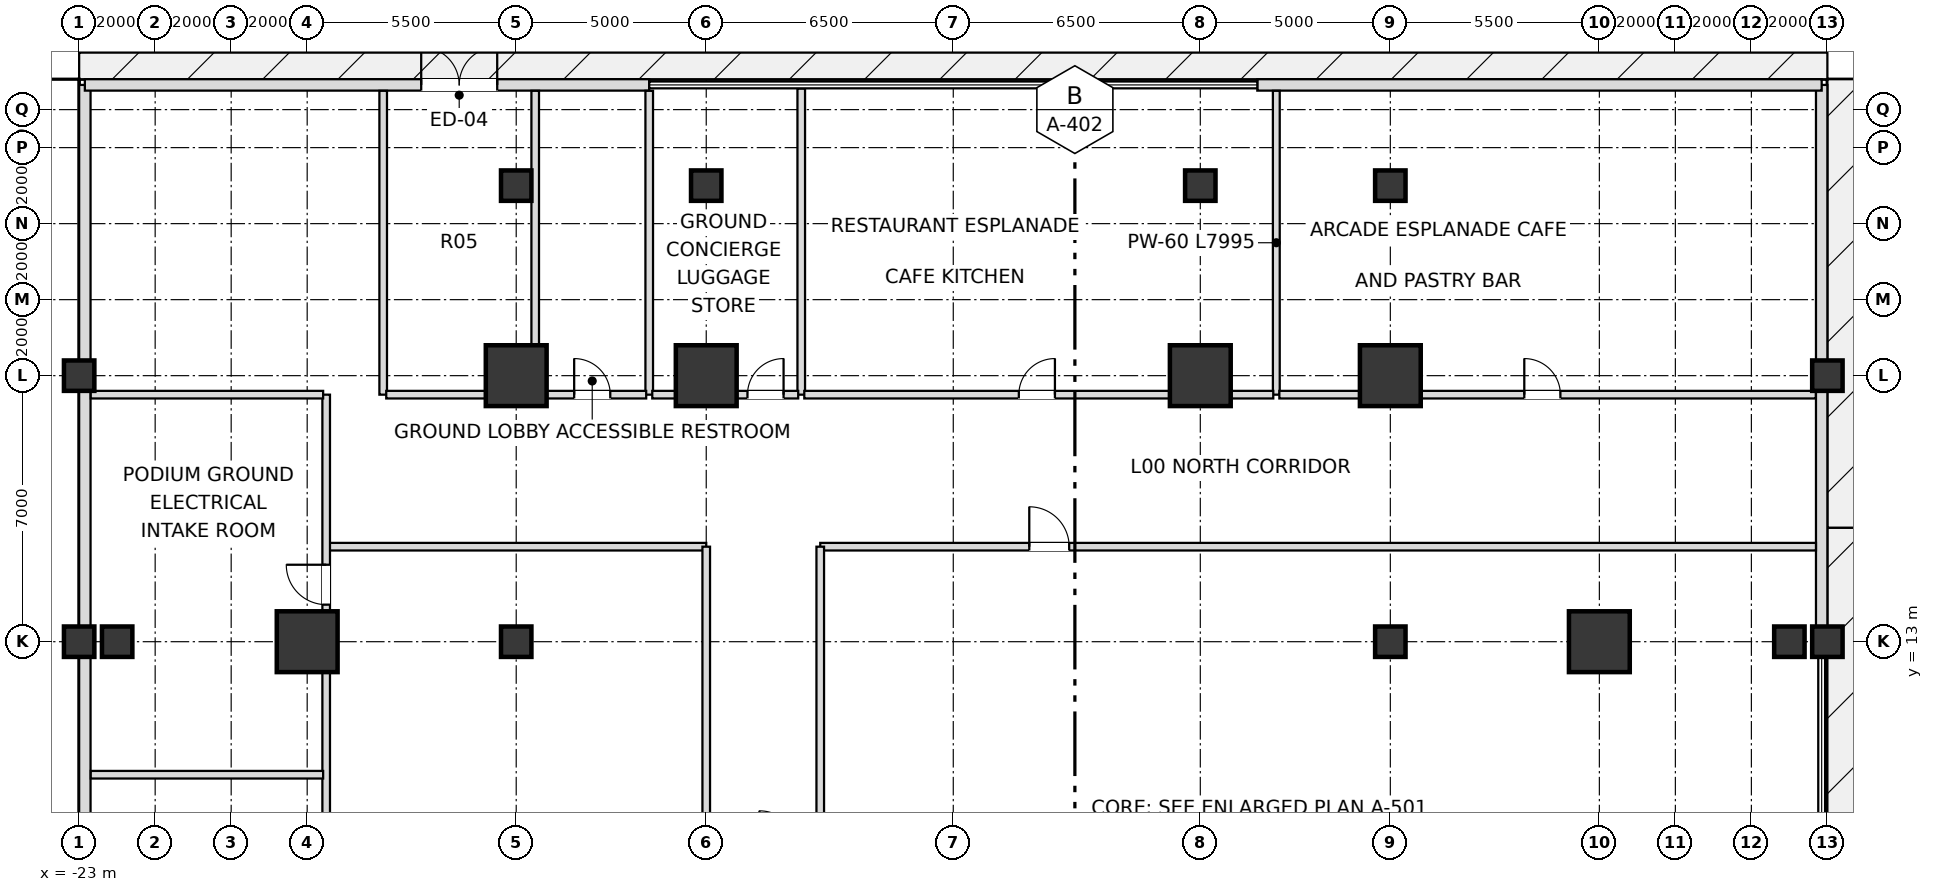
"""IFC4 building model, lengths in metres.
Left out: names, types, materials, properties, quantities, classifications, styles, units other than length and angle.
Written with IfcOpenShell. Run it as: python <this file> out.ifc"""

import sys

from ifc_helpers import new_model, si_unit, direction, frame, frame_2d, origin, origin_2d, place, context, subcontext, project, spatial, rectangle, extrude, element, fill, save


model = new_model("IFC4")
c1 = context("Model", 3, precision=1e-05, world=origin(), true_north=direction((0.0, 1.0)))
c2 = subcontext(c1, "Body", "Model", "MODEL_VIEW")
j1 = project(units=[si_unit("LENGTHUNIT", "METRE"), si_unit("PLANEANGLEUNIT", "RADIAN")], contexts=[c1])
p1 = place(None, origin())
s1 = spatial("IfcSite", under=j1, at=p1, CompositionType="ELEMENT")
p2 = place(p1, origin())
s2 = spatial("IfcBuilding", under=s1, at=p2, CompositionType="ELEMENT")
p3 = place(p2, origin())
s3 = spatial("IfcBuildingStorey", under=s2, at=p3, CompositionType="ELEMENT", Elevation=0.0)
for number, where, z_axis, x_axis in (
    (1, (17.0, 13.0, 0.0), (0.0, 0.0, 1.0), (1.0, 0.0, 0.0)),
    (2, (11.5, 20.0, 0.0), (0.0, 0.0, 1.0), (1.0, 0.0, 0.0)),
    (3, (6.5, 20.0, 0.0), (0.0, 0.0, 1.0), (1.0, 0.0, 0.0)),
    (4, (-6.5, 20.0, 0.0), (0.0, 0.0, 1.0), (1.0, 0.0, 0.0)),
    (5, (-11.5, 20.0, 0.0), (0.0, 0.0, 1.0), (1.0, 0.0, 0.0)),
    (6, (-17.0, 13.0, 0.0), (0.0, 0.0, 1.0), (1.0, 0.0, 0.0)),
):
    element("IfcColumn", number, at=place(p3, frame(where, z_axis=z_axis, x_axis=x_axis)), inside=s3, PredefinedType="USERDEFINED", context=c2, shape_type="SweptSolid", body=[
        extrude(rectangle(XDim=1.6, YDim=1.6, at=origin_2d()), origin(), (0.0, 0.0, 1.0), 6.0),
    ])
for number, where, z_axis, x_axis in (
    (7, (-23.0, 13.0, 0.0), (0.0, 0.0, 1.0), (1.0, 0.0, 0.0)),
    (8, (-23.0, 20.0, 0.0), (0.0, 0.0, 1.0), (1.0, 0.0, 0.0)),
    (9, (23.0, 13.0, 0.0), (0.0, 0.0, 1.0), (1.0, 0.0, 0.0)),
    (10, (23.0, 20.0, 0.0), (0.0, 0.0, 1.0), (1.0, 0.0, 0.0)),
    (11, (-11.5, 13.0, 0.0), (0.0, 0.0, 1.0), (1.0, 0.0, 0.0)),
    (12, (11.5, 13.0, 0.0), (0.0, 0.0, 1.0), (1.0, 0.0, 0.0)),
    (13, (-22.0, 13.0, 0.0), (0.0, 0.0, 1.0), (1.0, 0.0, 0.0)),
    (14, (-11.5, 25.0, 0.0), (0.0, 0.0, 1.0), (1.0, 0.0, 0.0)),
    (15, (-6.5, 25.0, 0.0), (0.0, 0.0, 1.0), (1.0, 0.0, 0.0)),
    (16, (6.5, 25.0, 0.0), (0.0, 0.0, 1.0), (1.0, 0.0, 0.0)),
    (17, (11.5, 25.0, 0.0), (0.0, 0.0, 1.0), (1.0, 0.0, 0.0)),
    (18, (22.0, 13.0, 0.0), (0.0, 0.0, 1.0), (1.0, 0.0, 0.0)),
):
    element("IfcColumn", number, at=place(p3, frame(where, z_axis=z_axis, x_axis=x_axis)), inside=s3, PredefinedType="COLUMN", context=c2, shape_type="SweptSolid", body=[
        extrude(rectangle(XDim=0.8, YDim=0.8, at=origin_2d()), origin(), (0.0, 0.0, 1.0), 6.0),
    ])
p4 = place(p3, frame((-22.85, 27.65, 0.0), z_axis=(0.0, 0.0, 1.0), x_axis=(0.0, -1.0, 0.0)))
e19 = element("IfcWall", 19, at=p4, inside=s3, PredefinedType="SOLIDWALL", context=c2, shape_type="SweptSolid", body=[
    extrude(rectangle(XDim=55.3, YDim=0.3, at=frame_2d((27.65, 0.0))), origin(), (0.0, 0.0, 1.0), 5.076),
])
p5 = place(p4, frame((21.0, 0.0, 0.0)))
e20 = element("IfcOpeningElement", 20, at=p5, cuts=e19, PredefinedType="OPENING", context=c2, shape_type="SweptSolid", body=[
    extrude(rectangle(XDim=4.2, YDim=3.4, at=frame_2d((2.1, 1.7))), frame((0.0, 0.16, 0.0), z_axis=(0.0, -1.0, 0.0), x_axis=(1.0, 0.0, 0.0)), (0.0, 0.0, 1.0), 0.32),
])
p6 = place(p3, frame((22.85, 13.0, 0.0), z_axis=(0.0, 0.0, 1.0), x_axis=(0.0, 1.0, 0.0)))
e21 = element("IfcWall", 21, at=p6, inside=s3, PredefinedType="SOLIDWALL", context=c2, shape_type="SweptSolid", body=[
    extrude(rectangle(XDim=14.65, YDim=0.3, at=frame_2d((7.325, 0.0))), origin(), (0.0, 0.0, 1.0), 5.076),
])
p7 = place(p3, frame((-22.85, 27.65, 0.0), z_axis=(0.0, 0.0, 1.0), x_axis=(1.0, 0.0, 0.0)))
e22 = element("IfcWall", 22, at=p7, inside=s3, PredefinedType="SOLIDWALL", context=c2, shape_type="SweptSolid", body=[
    extrude(rectangle(XDim=14.85, YDim=0.3, at=frame_2d((7.425, 0.0))), origin(), (0.0, 0.0, 1.0), 5.72),
])
p8 = place(p7, frame((8.85, 0.0, 0.0)))
e23 = element("IfcOpeningElement", 23, at=p8, cuts=e22, PredefinedType="OPENING", context=c2, shape_type="SweptSolid", body=[
    extrude(rectangle(XDim=2.0, YDim=2.2, at=frame_2d((1.0, 1.1))), frame((0.0, 0.16, 0.0), z_axis=(0.0, -1.0, 0.0), x_axis=(1.0, 0.0, 0.0)), (0.0, 0.0, 1.0), 0.32),
])
p9 = place(p3, frame((8.0, 27.65, 0.0), z_axis=(0.0, 0.0, 1.0), x_axis=(1.0, 0.0, 0.0)))
e24 = element("IfcWall", 24, at=p9, inside=s3, PredefinedType="SOLIDWALL", context=c2, shape_type="SweptSolid", body=[
    extrude(rectangle(XDim=14.85, YDim=0.3, at=frame_2d((7.425, 0.0))), origin(), (0.0, 0.0, 1.0), 5.72),
])
p10 = place(p3, frame((-16.5, 15.5, 0.0), z_axis=(0.0, 0.0, 1.0), x_axis=(1.0, 0.0, 0.0)))
e25 = element("IfcWall", 25, at=p10, inside=s3, PredefinedType="SOLIDWALL", context=c2, shape_type="SweptSolid", body=[
    extrude(rectangle(XDim=10.0, YDim=0.2, at=frame_2d((5.0, 0.0))), origin(), (0.0, 0.0, 1.0), 5.01),
])
p11 = place(p3, frame((-3.5, 15.5, 0.0), z_axis=(0.0, 0.0, 1.0), x_axis=(1.0, 0.0, 0.0)))
e26 = element("IfcWall", 26, at=p11, inside=s3, PredefinedType="SOLIDWALL", context=c2, shape_type="SweptSolid", body=[
    extrude(rectangle(XDim=26.2, YDim=0.2, at=frame_2d((13.1, 0.0))), origin(), (0.0, 0.0, 1.0), 5.01),
])
p12 = place(p11, frame((5.5, 0.0, 0.0)))
e27 = element("IfcOpeningElement", 27, at=p12, cuts=e26, PredefinedType="OPENING", context=c2, shape_type="SweptSolid", body=[
    extrude(rectangle(XDim=1.05, YDim=2.15, at=frame_2d((0.525, 1.075))), frame((0.0, 0.11, 0.0), z_axis=(0.0, -1.0, 0.0), x_axis=(1.0, 0.0, 0.0)), (0.0, 0.0, 1.0), 0.22),
])
for number, where, z_axis, x_axis in (
    (28, (-6.5, 7.5, 0.0), (0.0, 0.0, 1.0), (0.0, 1.0, 0.0)),
    (29, (-3.5, 7.5, 0.0), (0.0, 0.0, 1.0), (0.0, 1.0, 0.0)),
):
    element("IfcWall", number, at=place(p3, frame(where, z_axis=z_axis, x_axis=x_axis)), inside=s3, PredefinedType="SOLIDWALL", context=c2, shape_type="SweptSolid", body=[
        extrude(rectangle(XDim=8.0, YDim=0.2, at=frame_2d((4.0, 0.0))), origin(), (0.0, 0.0, 1.0), 5.01),
    ])
p13 = place(p3, frame((-16.5, -19.5, 0.0), z_axis=(0.0, 0.0, 1.0), x_axis=(0.0, 1.0, 0.0)))
e30 = element("IfcWall", 30, at=p13, inside=s3, PredefinedType="SOLIDWALL", context=c2, shape_type="SweptSolid", body=[
    extrude(rectangle(XDim=39.0, YDim=0.2, at=frame_2d((19.5, 0.0))), origin(), (0.0, 0.0, 1.0), 5.01),
])
p14 = place(p13, frame((20.975, 0.0, 0.0)))
e31 = element("IfcOpeningElement", 31, at=p14, cuts=e30, PredefinedType="OPENING", context=c2, shape_type="SweptSolid", body=[
    extrude(rectangle(XDim=1.05, YDim=2.15, at=frame_2d((0.525, 1.075))), frame((0.0, 0.11, 0.0), z_axis=(0.0, -1.0, 0.0), x_axis=(1.0, 0.0, 0.0)), (0.0, 0.0, 1.0), 0.22),
])
p15 = place(p13, frame((8.025, 0.0, 0.0)))
e32 = element("IfcOpeningElement", 32, at=p15, cuts=e30, PredefinedType="OPENING", context=c2, shape_type="SweptSolid", body=[
    extrude(rectangle(XDim=0.95, YDim=2.15, at=frame_2d((0.475, 1.075))), frame((0.0, 0.11, 0.0), z_axis=(0.0, -1.0, 0.0), x_axis=(1.0, 0.0, 0.0)), (0.0, 0.0, 1.0), 0.22),
])
p16 = place(p13, frame((33.475, 0.0, 0.0)))
e33 = element("IfcOpeningElement", 33, at=p16, cuts=e30, PredefinedType="OPENING", context=c2, shape_type="SweptSolid", body=[
    extrude(rectangle(XDim=1.05, YDim=2.15, at=frame_2d((0.525, 1.075))), frame((0.0, 0.11, 0.0), z_axis=(0.0, -1.0, 0.0), x_axis=(1.0, 0.0, 0.0)), (0.0, 0.0, 1.0), 0.22),
])
for number, where, z_axis, x_axis in (
    (34, (-15.0, 19.5, 0.0), (0.0, 0.0, 1.0), (0.0, 1.0, 0.0)),
    (35, (-11.0, 19.5, 0.0), (0.0, 0.0, 1.0), (0.0, 1.0, 0.0)),
    (36, (-8.0, 19.5, 0.0), (0.0, 0.0, 1.0), (0.0, 1.0, 0.0)),
):
    element("IfcWall", number, at=place(p3, frame(where, z_axis=z_axis, x_axis=x_axis)), inside=s3, PredefinedType="SOLIDWALL", context=c2, shape_type="SweptSolid", body=[
        extrude(rectangle(XDim=7.995, YDim=0.2, at=frame_2d((3.998, 0.0))), origin(), (0.0, 0.0, 1.0), 5.076),
    ])
p17 = place(p3, frame((-4.0, 19.5, 0.0), z_axis=(0.0, 0.0, 1.0), x_axis=(0.0, 1.0, 0.0)))
e37 = element("IfcWall", 37, at=p17, inside=s3, PredefinedType="SOLIDWALL", context=c2, shape_type="SweptSolid", body=[
    extrude(rectangle(XDim=8.055, YDim=0.2, at=frame_2d((4.027, 0.0))), origin(), (0.0, 0.0, 1.0), 5.076),
])
p18 = place(p3, frame((8.5, 19.5, 0.0), z_axis=(0.0, 0.0, 1.0), x_axis=(0.0, 1.0, 0.0)))
e38 = element("IfcWall", 38, at=p18, inside=s3, PredefinedType="PARTITIONING", context=c2, shape_type="SweptSolid", body=[
    extrude(rectangle(XDim=7.995, YDim=0.18, at=frame_2d((3.998, 0.0))), origin(), (0.0, 0.0, 1.0), 5.076),
])
p19 = place(p3, frame((-22.695, 9.5, 0.0), z_axis=(0.0, 0.0, 1.0), x_axis=(1.0, 0.0, 0.0)))
e39 = element("IfcWall", 39, at=p19, inside=s3, PredefinedType="SOLIDWALL", context=c2, shape_type="SweptSolid", body=[
    extrude(rectangle(XDim=6.115, YDim=0.2, at=frame_2d((3.058, 0.0))), origin(), (0.0, 0.0, 1.0), 5.01),
])
p20 = place(p3, frame((-22.695, 19.5, 0.0), z_axis=(0.0, 0.0, 1.0), x_axis=(1.0, 0.0, 0.0)))
e40 = element("IfcWall", 40, at=p20, inside=s3, PredefinedType="SOLIDWALL", context=c2, shape_type="SweptSolid", body=[
    extrude(rectangle(XDim=6.115, YDim=0.2, at=frame_2d((3.058, 0.0))), origin(), (0.0, 0.0, 1.0), 5.72),
])
p21 = place(p3, frame((-14.92, 19.5, 0.0), z_axis=(0.0, 0.0, 1.0), x_axis=(1.0, 0.0, 0.0)))
e41 = element("IfcWall", 41, at=p21, inside=s3, PredefinedType="SOLIDWALL", context=c2, shape_type="SweptSolid", body=[
    extrude(rectangle(XDim=3.84, YDim=0.2, at=frame_2d((1.92, 0.0))), origin(), (0.0, 0.0, 1.0), 5.72),
])
p22 = place(p3, frame((-10.92, 19.5, 0.0), z_axis=(0.0, 0.0, 1.0), x_axis=(1.0, 0.0, 0.0)))
e42 = element("IfcWall", 42, at=p22, inside=s3, PredefinedType="SOLIDWALL", context=c2, shape_type="SweptSolid", body=[
    extrude(rectangle(XDim=2.84, YDim=0.2, at=frame_2d((1.42, 0.0))), origin(), (0.0, 0.0, 1.0), 5.72),
])
p23 = place(p22, frame((0.945, 0.0, 0.0)))
e43 = element("IfcOpeningElement", 43, at=p23, cuts=e42, PredefinedType="OPENING", context=c2, shape_type="SweptSolid", body=[
    extrude(rectangle(XDim=0.95, YDim=2.15, at=frame_2d((0.475, 1.075))), frame((0.0, 0.11, 0.0), z_axis=(0.0, -1.0, 0.0), x_axis=(1.0, 0.0, 0.0)), (0.0, 0.0, 1.0), 0.22),
])
p24 = place(p3, frame((-7.92, 19.5, 0.0), z_axis=(0.0, 0.0, 1.0), x_axis=(1.0, 0.0, 0.0)))
e44 = element("IfcWall", 44, at=p24, inside=s3, PredefinedType="SOLIDWALL", context=c2, shape_type="SweptSolid", body=[
    extrude(rectangle(XDim=3.84, YDim=0.2, at=frame_2d((1.92, 0.0))), origin(), (0.0, 0.0, 1.0), 5.01),
])
p25 = place(p24, frame((2.505, 0.0, 0.0)))
e45 = element("IfcOpeningElement", 45, at=p25, cuts=e44, PredefinedType="OPENING", context=c2, shape_type="SweptSolid", body=[
    extrude(rectangle(XDim=0.95, YDim=2.15, at=frame_2d((0.475, 1.075))), frame((0.0, 0.11, 0.0), z_axis=(0.0, -1.0, 0.0), x_axis=(1.0, 0.0, 0.0)), (0.0, 0.0, 1.0), 0.22),
])
p26 = place(p3, frame((-3.92, 19.5, 0.0), z_axis=(0.0, 0.0, 1.0), x_axis=(1.0, 0.0, 0.0)))
e46 = element("IfcWall", 46, at=p26, inside=s3, PredefinedType="SOLIDWALL", context=c2, shape_type="SweptSolid", body=[
    extrude(rectangle(XDim=12.34, YDim=0.2, at=frame_2d((6.17, 0.0))), origin(), (0.0, 0.0, 1.0), 5.01),
])
p27 = place(p26, frame((5.645, 0.0, 0.0)))
e47 = element("IfcOpeningElement", 47, at=p27, cuts=e46, PredefinedType="OPENING", context=c2, shape_type="SweptSolid", body=[
    extrude(rectangle(XDim=0.95, YDim=2.15, at=frame_2d((0.475, 1.075))), frame((0.0, 0.11, 0.0), z_axis=(0.0, -1.0, 0.0), x_axis=(1.0, 0.0, 0.0)), (0.0, 0.0, 1.0), 0.22),
])
p28 = place(p3, frame((8.58, 19.5, 0.0), z_axis=(0.0, 0.0, 1.0), x_axis=(1.0, 0.0, 0.0)))
e48 = element("IfcWall", 48, at=p28, inside=s3, PredefinedType="SOLIDWALL", context=c2, shape_type="SweptSolid", body=[
    extrude(rectangle(XDim=14.115, YDim=0.2, at=frame_2d((7.058, 0.0))), origin(), (0.0, 0.0, 1.0), 5.72),
])
p29 = place(p28, frame((6.445, 0.0, 0.0)))
e49 = element("IfcOpeningElement", 49, at=p29, cuts=e48, PredefinedType="OPENING", context=c2, shape_type="SweptSolid", body=[
    extrude(rectangle(XDim=0.95, YDim=2.15, at=frame_2d((0.475, 1.075))), frame((0.0, 0.11, 0.0), z_axis=(0.0, -1.0, 0.0), x_axis=(1.0, 0.0, 0.0)), (0.0, 0.0, 1.0), 0.22),
])
p30 = place(p8, origin())
e50 = element("IfcDoor", 50, at=p30, inside=s3, OperationType="DOUBLE_DOOR_SINGLE_SWING", PredefinedType="DOOR", context=c2, shape_type="SweptSolid", body=[
    extrude(rectangle(XDim=2.0, YDim=2.2, at=frame_2d((1.0, 1.1))), frame((0.0, 0.025, 0.0), z_axis=(0.0, -1.0, 0.0), x_axis=(1.0, 0.0, 0.0)), (0.0, 0.0, 1.0), 0.05),
])
fill(e23, e50)
p31 = place(p12, origin())
e51 = element("IfcDoor", 51, at=p31, inside=s3, OperationType="SINGLE_SWING_LEFT", PredefinedType="DOOR", context=c2, shape_type="SweptSolid", body=[
    extrude(rectangle(XDim=1.05, YDim=2.15, at=frame_2d((0.525, 1.075))), frame((0.0, 0.025, 0.0), z_axis=(0.0, -1.0, 0.0), x_axis=(1.0, 0.0, 0.0)), (0.0, 0.0, 1.0), 0.05),
])
fill(e27, e51)
p32 = place(p16, origin())
e52 = element("IfcDoor", 52, at=p32, inside=s3, OperationType="SINGLE_SWING_RIGHT", PredefinedType="DOOR", context=c2, shape_type="SweptSolid", body=[
    extrude(rectangle(XDim=1.05, YDim=2.15, at=frame_2d((0.525, 1.075))), frame((0.0, 0.025, 0.0), z_axis=(0.0, -1.0, 0.0), x_axis=(1.0, 0.0, 0.0)), (0.0, 0.0, 1.0), 0.05),
])
fill(e33, e52)
p33 = place(p29, origin())
e53 = element("IfcDoor", 53, at=p33, inside=s3, OperationType="SINGLE_SWING_LEFT", PredefinedType="DOOR", context=c2, shape_type="SweptSolid", body=[
    extrude(rectangle(XDim=0.95, YDim=2.15, at=frame_2d((0.475, 1.075))), frame((0.0, 0.025, 0.0), z_axis=(0.0, -1.0, 0.0), x_axis=(1.0, 0.0, 0.0)), (0.0, 0.0, 1.0), 0.05),
])
fill(e49, e53)
p34 = place(p27, origin())
e54 = element("IfcDoor", 54, at=p34, inside=s3, OperationType="SINGLE_SWING_RIGHT", PredefinedType="DOOR", context=c2, shape_type="SweptSolid", body=[
    extrude(rectangle(XDim=0.95, YDim=2.15, at=frame_2d((0.475, 1.075))), frame((0.0, 0.025, 0.0), z_axis=(0.0, -1.0, 0.0), x_axis=(1.0, 0.0, 0.0)), (0.0, 0.0, 1.0), 0.05),
])
fill(e47, e54)
p35 = place(p23, origin())
e55 = element("IfcDoor", 55, at=p35, inside=s3, OperationType="SINGLE_SWING_LEFT", PredefinedType="DOOR", context=c2, shape_type="SweptSolid", body=[
    extrude(rectangle(XDim=0.95, YDim=2.15, at=frame_2d((0.475, 1.075))), frame((0.0, 0.025, 0.0), z_axis=(0.0, -1.0, 0.0), x_axis=(1.0, 0.0, 0.0)), (0.0, 0.0, 1.0), 0.05),
])
fill(e43, e55)
p36 = place(p25, origin())
e56 = element("IfcDoor", 56, at=p36, inside=s3, OperationType="SINGLE_SWING_RIGHT", PredefinedType="DOOR", context=c2, shape_type="SweptSolid", body=[
    extrude(rectangle(XDim=0.95, YDim=2.15, at=frame_2d((0.475, 1.075))), frame((0.0, 0.025, 0.0), z_axis=(0.0, -1.0, 0.0), x_axis=(1.0, 0.0, 0.0)), (0.0, 0.0, 1.0), 0.05),
])
fill(e45, e56)
save(model, sys.argv[1])
